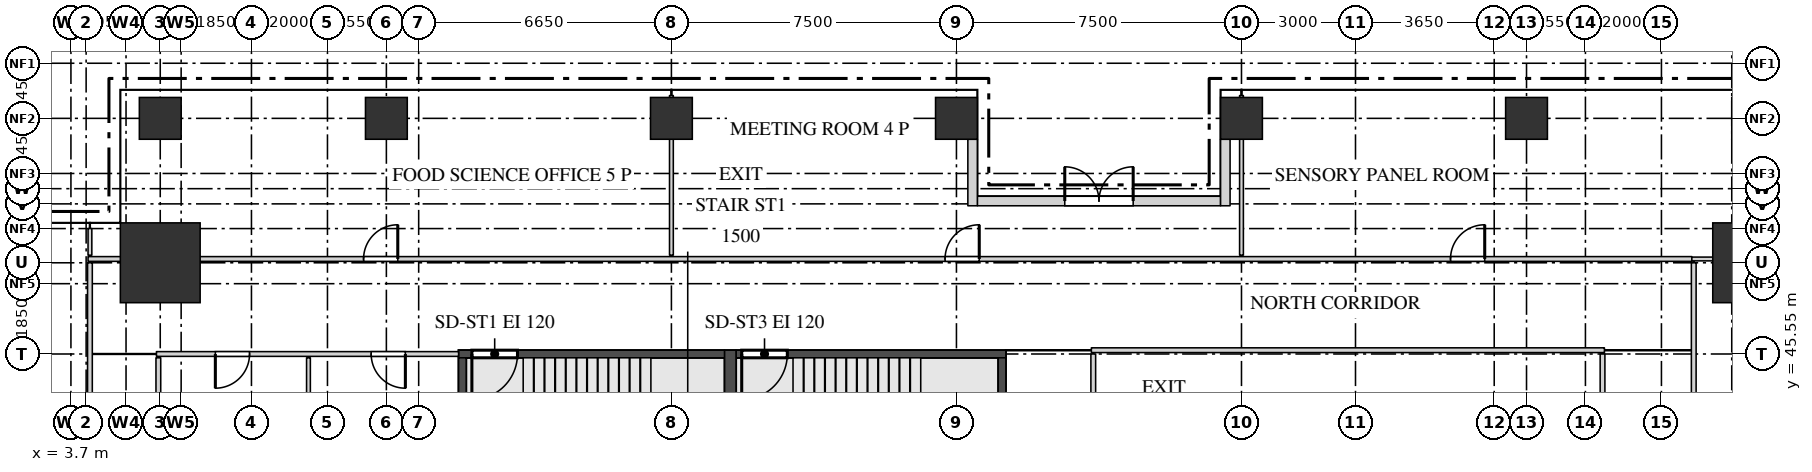
"""IFC4 building model, lengths in metres.
Left out: names, types, materials, properties, quantities, classifications, styles, units other than length and angle.
Written with IfcOpenShell. Run it as: python <this file> out.ifc"""

import sys

from ifc_helpers import new_model, si_unit, direction, frame, frame_2d, origin, origin_2d, place, context, subcontext, project, spatial, rectangle, extrude, source, transform, mapped, element, fill, save


model = new_model("IFC4")
c1 = context("Model", 3, precision=1e-05, world=origin(), true_north=direction((0.0, 1.0)))
c2 = subcontext(c1, "Body", "Model", "MODEL_VIEW")
j1 = project(units=[si_unit("LENGTHUNIT", "METRE"), si_unit("PLANEANGLEUNIT", "RADIAN")], contexts=[c1])
p1 = place(None, origin())
s1 = spatial("IfcSite", under=j1, at=p1, CompositionType="ELEMENT")
p2 = place(p1, origin())
s2 = spatial("IfcBuilding", under=s1, at=p2, CompositionType="ELEMENT")
p3 = place(p2, frame((0.0, 0.0, 114.7)))
s3 = spatial("IfcBuildingStorey", under=s2, at=p3, CompositionType="ELEMENT", Elevation=114.7)
m1 = source(origin(), c2, "Body", "SweptSolid", [
    extrude(rectangle(XDim=7.0, YDim=0.2, at=frame_2d((3.5, 0.0))), origin(), (0.0, 0.0, 1.0), 4.1),
])
p4 = place(p3, frame((13.9, 45.55, 0.0), z_axis=(0.0, 0.0, 1.0), x_axis=(1.0, 0.0, 0.0)))
e1 = element("IfcWall", 1, at=p4, inside=s3, PredefinedType="SHEAR", context=c2, shape_type="MappedRepresentation", body=[
    mapped(m1, transform((0.0, 0.0, 0.0))),
])
m2 = source(origin(), c2, "Body", "SweptSolid", [
    extrude(rectangle(XDim=1.2, YDim=2.1, at=frame_2d((0.6, 1.05))), frame((0.0, 0.11, 0.0), z_axis=(0.0, -1.0, 0.0), x_axis=(1.0, 0.0, 0.0)), (0.0, 0.0, 1.0), 0.22),
])
p5 = place(p4, frame((0.35, 0.0, 0.0)))
e2 = element("IfcOpeningElement", 2, at=p5, cuts=e1, PredefinedType="OPENING", context=c2, shape_type="MappedRepresentation", body=[
    mapped(m2, transform((0.0, 0.0, 0.0))),
])
m3 = source(origin(), c2, "Body", "SweptSolid", [
    extrude(rectangle(XDim=7.1, YDim=0.2, at=frame_2d((3.55, 0.0))), origin(), (0.0, 0.0, 1.0), 4.1),
])
p6 = place(p3, frame((21.2, 45.55, 0.0), z_axis=(0.0, 0.0, 1.0), x_axis=(1.0, 0.0, 0.0)))
e3 = element("IfcWall", 3, at=p6, inside=s3, PredefinedType="SHEAR", context=c2, shape_type="MappedRepresentation", body=[
    mapped(m3, transform((0.0, 0.0, 0.0))),
])
p7 = place(p6, frame((0.15, 0.0, 0.0)))
e4 = element("IfcOpeningElement", 4, at=p7, cuts=e3, PredefinedType="OPENING", context=c2, shape_type="MappedRepresentation", body=[
    mapped(m2, transform((0.0, 0.0, 0.0))),
])
m4 = source(origin(), c2, "Body", "SweptSolid", [
    extrude(rectangle(XDim=3.75, YDim=0.3, at=frame_2d((1.875, 0.0))), origin(), (0.0, 0.0, 1.0), 4.1),
])
p8 = place(p3, frame((21.05, 41.9, 0.0), z_axis=(0.0, 0.0, 1.0), x_axis=(0.0, 1.0, 0.0)))
e5 = element("IfcWall", 5, at=p8, inside=s3, PredefinedType="SHEAR", context=c2, shape_type="MappedRepresentation", body=[
    mapped(m4, transform((0.0, 0.0, 0.0))),
])
m5 = source(origin(), c2, "Body", "SweptSolid", [
    extrude(rectangle(XDim=3.35, YDim=0.2, at=frame_2d((1.675, 0.0))), origin(), (0.0, 0.0, 1.0), 4.1),
])
for number, where, z_axis, x_axis in (
    (6, (14.0, 42.1, 0.0), (0.0, 0.0, 1.0), (0.0, 1.0, 0.0)),
    (7, (28.2, 42.1, 0.0), (0.0, 0.0, 1.0), (0.0, 1.0, 0.0)),
):
    element("IfcWall", number, at=place(p3, frame(where, z_axis=z_axis, x_axis=x_axis)), inside=s3, PredefinedType="SHEAR", context=c2, shape_type="MappedRepresentation", body=[
        mapped(m5, transform((0.0, 0.0, 0.0))),
    ])
m6 = source(origin(), c2, "Body", "SweptSolid", [
    extrude(rectangle(XDim=2.1, YDim=2.1, at=origin_2d()), origin(), (0.0, 0.0, 1.0), 4.4),
])
for number, where, z_axis, x_axis in (
    (8, (47.95, 47.95, 0.0), (0.0, 0.0, 1.0), (1.0, 0.0, 0.0)),
    (9, (6.05, 47.95, 0.0), (0.0, 0.0, 1.0), (1.0, 0.0, 0.0)),
):
    element("IfcColumn", number, at=place(p3, frame(where, z_axis=z_axis, x_axis=x_axis)), inside=s3, PredefinedType="COLUMN", context=c2, shape_type="MappedRepresentation", body=[
        mapped(m6, transform((0.0, 0.0, 0.0))),
    ])
m7 = source(origin(), c2, "Body", "SweptSolid", [
    extrude(rectangle(XDim=1.1, YDim=1.1, at=origin_2d()), origin(), (0.0, 0.0, 1.0), 4.1),
])
for number, where, z_axis, x_axis in (
    (10, (6.05, 51.75, 0.0), (0.0, 0.0, 1.0), (1.0, 0.0, 0.0)),
    (11, (12.0, 51.75, 0.0), (0.0, 0.0, 1.0), (1.0, 0.0, 0.0)),
    (12, (19.5, 51.75, 0.0), (0.0, 0.0, 1.0), (1.0, 0.0, 0.0)),
    (13, (27.0, 51.75, 0.0), (0.0, 0.0, 1.0), (1.0, 0.0, 0.0)),
    (14, (34.5, 51.75, 0.0), (0.0, 0.0, 1.0), (1.0, 0.0, 0.0)),
    (15, (42.0, 51.75, 0.0), (0.0, 0.0, 1.0), (1.0, 0.0, 0.0)),
):
    element("IfcColumn", number, at=place(p3, frame(where, z_axis=z_axis, x_axis=x_axis)), inside=s3, PredefinedType="COLUMN", context=c2, shape_type="MappedRepresentation", body=[
        mapped(m7, transform((0.0, 0.0, 0.0))),
    ])
m8 = source(origin(), c2, "Body", "SweptSolid", [
    extrude(rectangle(XDim=6.4, YDim=0.25, at=frame_2d((3.2, 0.0))), origin(), (0.0, 0.0, 1.0), 4.1),
])
p9 = place(p3, frame((27.55, 49.575, 0.0), z_axis=(0.0, 0.0, 1.0), x_axis=(1.0, 0.0, 0.0)))
e16 = element("IfcWall", 16, at=p9, inside=s3, PredefinedType="SOLIDWALL", context=c2, shape_type="MappedRepresentation", body=[
    mapped(m8, transform((0.0, 0.0, 0.0))),
])
m9 = source(origin(), c2, "Body", "SweptSolid", [
    extrude(rectangle(XDim=1.65, YDim=2.4, at=frame_2d((0.825, 1.2))), frame((0.0, 0.135, 0.0), z_axis=(0.0, -1.0, 0.0), x_axis=(1.0, 0.0, 0.0)), (0.0, 0.0, 1.0), 0.27),
])
p10 = place(p9, frame((0.35, 0.0, 0.0)))
e17 = element("IfcOpeningElement", 17, at=p10, cuts=e16, PredefinedType="OPENING", context=c2, shape_type="MappedRepresentation", body=[
    mapped(m9, transform((0.0, 0.0, 0.0))),
])
p11 = place(p9, frame((4.4, 0.0, 0.0)))
e18 = element("IfcOpeningElement", 18, at=p11, cuts=e16, PredefinedType="OPENING", context=c2, shape_type="MappedRepresentation", body=[
    mapped(m9, transform((0.0, 0.0, 0.0))),
])
m10 = source(origin(), c2, "Body", "SweptSolid", [
    extrude(rectangle(XDim=1.8, YDim=2.4, at=frame_2d((0.9, 1.2))), frame((0.0, 0.135, 0.0), z_axis=(0.0, -1.0, 0.0), x_axis=(1.0, 0.0, 0.0)), (0.0, 0.0, 1.0), 0.27),
])
p12 = place(p9, frame((2.3, 0.0, 0.0)))
e19 = element("IfcOpeningElement", 19, at=p12, cuts=e16, PredefinedType="OPENING", context=c2, shape_type="MappedRepresentation", body=[
    mapped(m10, transform((0.0, 0.0, 0.0))),
])
m11 = source(origin(), c2, "Body", "SweptSolid", [
    extrude(rectangle(XDim=1.75, YDim=0.25, at=frame_2d((0.875, 0.0))), origin(), (0.0, 0.0, 1.0), 3.8),
])
for number, where, z_axis, x_axis in (
    (20, (27.425, 51.2, 0.0), (0.0, 0.0, 1.0), (0.0, -1.0, 0.0)),
    (21, (34.075, 51.2, 0.0), (0.0, 0.0, 1.0), (0.0, -1.0, 0.0)),
):
    element("IfcWall", number, at=place(p3, frame(where, z_axis=z_axis, x_axis=x_axis)), inside=s3, PredefinedType="SOLIDWALL", context=c2, shape_type="MappedRepresentation", body=[
        mapped(m11, transform((0.0, 0.0, 0.0))),
    ])
m12 = source(origin(), c2, "Body", "SweptSolid", [
    extrude(rectangle(XDim=37.65, YDim=0.125, at=frame_2d((18.825, 0.0))), origin(), (0.0, 0.0, 1.0), 4.2),
])
p13 = place(p3, frame((46.4, 10.3, 0.0), z_axis=(0.0, 0.0, 1.0), x_axis=(0.0, 1.0, 0.0)))
e22 = element("IfcWall", 22, at=p13, inside=s3, PredefinedType="PARTITIONING", context=c2, shape_type="MappedRepresentation", body=[
    mapped(m12, transform((0.0, 0.0, 0.0))),
])
m13 = source(origin(), c2, "Body", "SweptSolid", [
    extrude(rectangle(XDim=1.2, YDim=2.1, at=frame_2d((0.6, 1.05))), frame((0.0, 0.073, 0.0), z_axis=(0.0, -1.0, 0.0), x_axis=(1.0, 0.0, 0.0)), (0.0, 0.0, 1.0), 0.145),
])
p14 = place(p13, frame((11.6, 0.0, 0.0)))
e23 = element("IfcOpeningElement", 23, at=p14, cuts=e22, PredefinedType="OPENING", context=c2, shape_type="MappedRepresentation", body=[
    mapped(m13, transform((0.0, 0.0, 0.0))),
])
m14 = source(origin(), c2, "Body", "SweptSolid", [
    extrude(rectangle(XDim=0.9, YDim=2.1, at=frame_2d((0.45, 1.05))), frame((0.0, 0.073, 0.0), z_axis=(0.0, -1.0, 0.0), x_axis=(1.0, 0.0, 0.0)), (0.0, 0.0, 1.0), 0.145),
])
p15 = place(p13, frame((29.45, 0.0, 0.0)))
e24 = element("IfcOpeningElement", 24, at=p15, cuts=e22, PredefinedType="OPENING", context=c2, shape_type="MappedRepresentation", body=[
    mapped(m14, transform((0.0, 0.0, 0.0))),
])
m15 = source(origin(), c2, "Body", "SweptSolid", [
    extrude(rectangle(XDim=32.85, YDim=0.125, at=frame_2d((16.425, 0.0))), origin(), (0.0, 0.0, 1.0), 4.2),
])
p16 = place(p3, frame((44.0, 12.7, 0.0), z_axis=(0.0, 0.0, 1.0), x_axis=(0.0, 1.0, 0.0)))
e25 = element("IfcWall", 25, at=p16, inside=s3, PredefinedType="PARTITIONING", context=c2, shape_type="MappedRepresentation", body=[
    mapped(m15, transform((0.0, 0.0, 0.0))),
])
p17 = place(p16, frame((18.2, 0.0, 0.0)))
e26 = element("IfcOpeningElement", 26, at=p17, cuts=e25, PredefinedType="OPENING", context=c2, shape_type="MappedRepresentation", body=[
    mapped(m13, transform((0.0, 0.0, 0.0))),
])
p18 = place(p16, frame((27.5, 0.0, 0.0)))
e27 = element("IfcOpeningElement", 27, at=p18, cuts=e25, PredefinedType="OPENING", context=c2, shape_type="MappedRepresentation", body=[
    mapped(m13, transform((0.0, 0.0, 0.0))),
])
m16 = source(origin(), c2, "Body", "SweptSolid", [
    extrude(rectangle(XDim=28.75, YDim=0.125, at=frame_2d((14.375, 0.0))), origin(), (0.0, 0.0, 1.0), 4.2),
])
p19 = place(p3, frame((4.2, 19.2, 0.0), z_axis=(0.0, 0.0, 1.0), x_axis=(0.0, 1.0, 0.0)))
e28 = element("IfcWall", 28, at=p19, inside=s3, PredefinedType="PARTITIONING", context=c2, shape_type="MappedRepresentation", body=[
    mapped(m16, transform((0.0, 0.0, 0.0))),
])
p20 = place(p19, frame((3.45, 0.0, 0.0)))
e29 = element("IfcOpeningElement", 29, at=p20, cuts=e28, PredefinedType="OPENING", context=c2, shape_type="MappedRepresentation", body=[
    mapped(m14, transform((0.0, 0.0, 0.0))),
])
p21 = place(p19, frame((16.5, 0.0, 0.0)))
e30 = element("IfcOpeningElement", 30, at=p21, cuts=e28, PredefinedType="OPENING", context=c2, shape_type="MappedRepresentation", body=[
    mapped(m14, transform((0.0, 0.0, 0.0))),
])
m17 = source(origin(), c2, "Body", "SweptSolid", [
    extrude(rectangle(XDim=9.45, YDim=0.125, at=frame_2d((4.725, 0.0))), origin(), (0.0, 0.0, 1.0), 4.2),
])
p22 = place(p3, frame((30.6, 36.1, 0.0), z_axis=(0.0, 0.0, 1.0), x_axis=(0.0, 1.0, 0.0)))
e31 = element("IfcWall", 31, at=p22, inside=s3, PredefinedType="PARTITIONING", context=c2, shape_type="MappedRepresentation", body=[
    mapped(m17, transform((0.0, 0.0, 0.0))),
])
m18 = source(origin(), c2, "Body", "SweptSolid", [
    extrude(rectangle(XDim=3.45, YDim=0.125, at=frame_2d((1.725, 0.0))), origin(), (0.0, 0.0, 1.0), 4.2),
])
p23 = place(p3, frame((6.0, 42.0, 0.0), z_axis=(0.0, 0.0, 1.0), x_axis=(0.0, 1.0, 0.0)))
e32 = element("IfcWall", 32, at=p23, inside=s3, PredefinedType="PARTITIONING", context=c2, shape_type="MappedRepresentation", body=[
    mapped(m18, transform((0.0, 0.0, 0.0))),
])
m19 = source(origin(), c2, "Body", "SweptSolid", [
    extrude(rectangle(XDim=3.45, YDim=0.1, at=frame_2d((1.725, 0.0))), origin(), (0.0, 0.0, 1.0), 4.2),
])
p24 = place(p3, frame((9.95, 42.0, 0.0), z_axis=(0.0, 0.0, 1.0), x_axis=(0.0, 1.0, 0.0)))
e33 = element("IfcWall", 33, at=p24, inside=s3, PredefinedType="PARTITIONING", context=c2, shape_type="MappedRepresentation", body=[
    mapped(m19, transform((0.0, 0.0, 0.0))),
])
m20 = source(origin(), c2, "Body", "SweptSolid", [
    extrude(rectangle(XDim=7.95, YDim=0.125, at=frame_2d((3.975, 0.0))), origin(), (0.0, 0.0, 1.0), 4.2),
])
p25 = place(p3, frame((5.95, 45.55, 0.0), z_axis=(0.0, 0.0, 1.0), x_axis=(1.0, 0.0, 0.0)))
e34 = element("IfcWall", 34, at=p25, inside=s3, PredefinedType="PARTITIONING", context=c2, shape_type="MappedRepresentation", body=[
    mapped(m20, transform((0.0, 0.0, 0.0))),
])
p26 = place(p25, frame((1.55, 0.0, 0.0)))
e35 = element("IfcOpeningElement", 35, at=p26, cuts=e34, PredefinedType="OPENING", context=c2, shape_type="MappedRepresentation", body=[
    mapped(m14, transform((0.0, 0.0, 0.0))),
])
p27 = place(p25, frame((5.65, 0.0, 0.0)))
e36 = element("IfcOpeningElement", 36, at=p27, cuts=e34, PredefinedType="OPENING", context=c2, shape_type="MappedRepresentation", body=[
    mapped(m14, transform((0.0, 0.0, 0.0))),
])
m21 = source(origin(), c2, "Body", "SweptSolid", [
    extrude(rectangle(XDim=13.5, YDim=0.125, at=frame_2d((6.75, 0.0))), origin(), (0.0, 0.0, 1.0), 4.2),
])
p28 = place(p3, frame((30.55, 45.65, 0.0), z_axis=(0.0, 0.0, 1.0), x_axis=(1.0, 0.0, 0.0)))
e37 = element("IfcWall", 37, at=p28, inside=s3, PredefinedType="PARTITIONING", context=c2, shape_type="MappedRepresentation", body=[
    mapped(m21, transform((0.0, 0.0, 0.0))),
])
m22 = source(origin(), c2, "Body", "SweptSolid", [
    extrude(rectangle(XDim=42.2, YDim=0.125, at=frame_2d((21.1, 0.0))), origin(), (0.0, 0.0, 1.0), 3.55),
])
p29 = place(p3, frame((4.15, 48.05, 0.0), z_axis=(0.0, 0.0, 1.0), x_axis=(1.0, 0.0, 0.0)))
e38 = element("IfcWall", 38, at=p29, inside=s3, PredefinedType="PARTITIONING", context=c2, shape_type="MappedRepresentation", body=[
    mapped(m22, transform((0.0, 0.0, 0.0))),
])
p30 = place(p29, frame((7.25, 0.0, 0.0)))
e39 = element("IfcOpeningElement", 39, at=p30, cuts=e38, PredefinedType="OPENING", context=c2, shape_type="MappedRepresentation", body=[
    mapped(m14, transform((0.0, 0.0, 0.0))),
])
p31 = place(p29, frame((22.55, 0.0, 0.0)))
e40 = element("IfcOpeningElement", 40, at=p31, cuts=e38, PredefinedType="OPENING", context=c2, shape_type="MappedRepresentation", body=[
    mapped(m14, transform((0.0, 0.0, 0.0))),
])
p32 = place(p29, frame((35.85, 0.0, 0.0)))
e41 = element("IfcOpeningElement", 41, at=p32, cuts=e38, PredefinedType="OPENING", context=c2, shape_type="MappedRepresentation", body=[
    mapped(m14, transform((0.0, 0.0, 0.0))),
])
m23 = source(origin(), c2, "Body", "SweptSolid", [
    extrude(rectangle(XDim=6.0, YDim=0.1, at=frame_2d((3.0, 0.0))), origin(), (0.0, 0.0, 1.0), 3.55),
])
p33 = place(p3, frame((46.35, 48.05, 0.0), z_axis=(0.0, 0.0, 1.0), x_axis=(1.0, 0.0, 0.0)))
e42 = element("IfcWall", 42, at=p33, inside=s3, PredefinedType="PARTITIONING", context=c2, shape_type="MappedRepresentation", body=[
    mapped(m23, transform((0.0, 0.0, 0.0))),
])
m24 = source(origin(), c2, "Body", "SweptSolid", [
    extrude(rectangle(XDim=0.7, YDim=0.1, at=frame_2d((0.35, 0.0))), origin(), (0.0, 0.0, 1.0), 4.2),
])
p34 = place(p3, frame((4.2, 48.15, 0.0), z_axis=(0.0, 0.0, 1.0), x_axis=(0.0, 1.0, 0.0)))
e43 = element("IfcWall", 43, at=p34, inside=s3, PredefinedType="PARTITIONING", context=c2, shape_type="MappedRepresentation", body=[
    mapped(m24, transform((0.0, 0.0, 0.0))),
])
m25 = source(origin(), c2, "Body", "SweptSolid", [
    extrude(rectangle(XDim=4.2, YDim=0.1, at=frame_2d((2.1, 0.0))), origin(), (0.0, 0.0, 1.0), 3.77),
])
p35 = place(p3, frame((19.5, 48.15, 0.0), z_axis=(0.0, 0.0, 1.0), x_axis=(0.0, 1.0, 0.0)))
e44 = element("IfcWall", 44, at=p35, inside=s3, PredefinedType="PARTITIONING", context=c2, shape_type="MappedRepresentation", body=[
    mapped(m25, transform((0.0, 0.0, 0.0))),
])
m26 = source(origin(), c2, "Body", "SweptSolid", [
    extrude(rectangle(XDim=4.2, YDim=0.1, at=frame_2d((2.1, 0.0))), origin(), (0.0, 0.0, 1.0), 3.6),
])
p36 = place(p3, frame((34.5, 48.15, 0.0), z_axis=(0.0, 0.0, 1.0), x_axis=(0.0, 1.0, 0.0)))
e45 = element("IfcWall", 45, at=p36, inside=s3, PredefinedType="PARTITIONING", context=c2, shape_type="MappedRepresentation", body=[
    mapped(m26, transform((0.0, 0.0, 0.0))),
])
m27 = source(origin(), c2, "Body", "SweptSolid", [
    extrude(rectangle(XDim=1.65, YDim=2.4, at=frame_2d((0.825, 1.2))), frame((0.0, 0.03, 0.0), z_axis=(0.0, -1.0, 0.0), x_axis=(1.0, 0.0, 0.0)), (0.0, 0.0, 1.0), 0.06),
])
p37 = place(p10, origin())
e46 = element("IfcWindow", 46, at=p37, inside=s3, PartitioningType="SINGLE_PANEL", PredefinedType="WINDOW", context=c2, shape_type="MappedRepresentation", body=[
    mapped(m27, transform((0.0, 0.0, 0.0))),
])
fill(e17, e46)
p38 = place(p11, origin())
e47 = element("IfcWindow", 47, at=p38, inside=s3, PartitioningType="SINGLE_PANEL", PredefinedType="WINDOW", context=c2, shape_type="MappedRepresentation", body=[
    mapped(m27, transform((0.0, 0.0, 0.0))),
])
fill(e18, e47)
m28 = source(origin(), c2, "Body", "SweptSolid", [
    extrude(rectangle(XDim=1.8, YDim=2.4, at=frame_2d((0.9, 1.2))), frame((0.0, 0.025, 0.0), z_axis=(0.0, -1.0, 0.0), x_axis=(1.0, 0.0, 0.0)), (0.0, 0.0, 1.0), 0.05),
])
p39 = place(p12, origin())
e48 = element("IfcDoor", 48, at=p39, inside=s3, OperationType="DOUBLE_DOOR_DOUBLE_SWING", PredefinedType="DOOR", context=c2, shape_type="MappedRepresentation", body=[
    mapped(m28, transform((0.0, 0.0, 0.0))),
])
fill(e19, e48)
m29 = source(origin(), c2, "Body", "SweptSolid", [
    extrude(rectangle(XDim=0.9, YDim=2.1, at=frame_2d((0.45, 1.05))), frame((0.0, 0.025, 0.0), z_axis=(0.0, -1.0, 0.0), x_axis=(1.0, 0.0, 0.0)), (0.0, 0.0, 1.0), 0.05),
])
p40 = place(p30, origin())
e49 = element("IfcDoor", 49, at=p40, inside=s3, OperationType="SINGLE_SWING_LEFT", PredefinedType="DOOR", context=c2, shape_type="MappedRepresentation", body=[
    mapped(m29, transform((0.0, 0.0, 0.0))),
])
fill(e39, e49)
p41 = place(p31, origin())
e50 = element("IfcDoor", 50, at=p41, inside=s3, OperationType="SINGLE_SWING_LEFT", PredefinedType="DOOR", context=c2, shape_type="MappedRepresentation", body=[
    mapped(m29, transform((0.0, 0.0, 0.0))),
])
fill(e40, e50)
p42 = place(p32, origin())
e51 = element("IfcDoor", 51, at=p42, inside=s3, OperationType="SINGLE_SWING_LEFT", PredefinedType="DOOR", context=c2, shape_type="MappedRepresentation", body=[
    mapped(m29, transform((0.0, 0.0, 0.0))),
])
fill(e41, e51)
p43 = place(p26, origin())
e52 = element("IfcDoor", 52, at=p43, inside=s3, OperationType="SINGLE_SWING_LEFT", PredefinedType="DOOR", context=c2, shape_type="MappedRepresentation", body=[
    mapped(m29, transform((0.0, 0.0, 0.0))),
])
fill(e35, e52)
p44 = place(p27, origin())
e53 = element("IfcDoor", 53, at=p44, inside=s3, OperationType="SINGLE_SWING_RIGHT", PredefinedType="DOOR", context=c2, shape_type="MappedRepresentation", body=[
    mapped(m29, transform((0.0, 0.0, 0.0))),
])
fill(e36, e53)
m30 = source(origin(), c2, "Body", "SweptSolid", [
    extrude(rectangle(XDim=1.2, YDim=2.1, at=frame_2d((0.6, 1.05))), frame((0.0, 0.025, 0.0), z_axis=(0.0, -1.0, 0.0), x_axis=(1.0, 0.0, 0.0)), (0.0, 0.0, 1.0), 0.05),
])
p45 = place(p5, origin())
e54 = element("IfcDoor", 54, at=p45, inside=s3, OperationType="SINGLE_SWING_LEFT", PredefinedType="DOOR", context=c2, shape_type="MappedRepresentation", body=[
    mapped(m30, transform((0.0, 0.0, 0.0))),
])
fill(e2, e54)
p46 = place(p7, origin())
e55 = element("IfcDoor", 55, at=p46, inside=s3, OperationType="SINGLE_SWING_LEFT", PredefinedType="DOOR", context=c2, shape_type="MappedRepresentation", body=[
    mapped(m30, transform((0.0, 0.0, 0.0))),
])
fill(e4, e55)
save(model, sys.argv[1])
